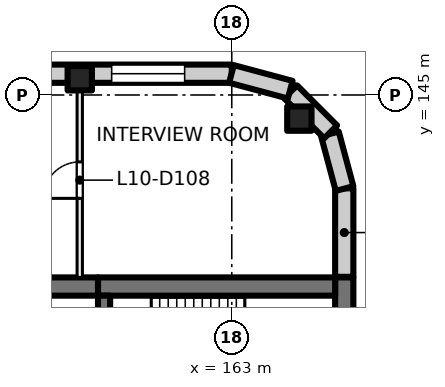
"""IFC4 building model, lengths in metres.
Left out: names, types, materials, properties, quantities, classifications, styles, units other than length and angle.
Written with IfcOpenShell. Run it as: python <this file> out.ifc"""

import sys

from ifc_helpers import new_model, si_unit, direction, frame, frame_2d, origin, origin_2d, place, context, subcontext, project, spatial, rectangle, extrude, element, fill, save


model = new_model("IFC4")
c1 = context("Model", 3, precision=1e-05, world=origin(), true_north=direction((0.0, 1.0)))
c2 = subcontext(c1, "Body", "Model", "MODEL_VIEW")
j1 = project(units=[si_unit("LENGTHUNIT", "METRE"), si_unit("PLANEANGLEUNIT", "RADIAN")], contexts=[c1])
p1 = place(None, origin())
s1 = spatial("IfcSite", under=j1, at=p1, CompositionType="ELEMENT")
p2 = place(p1, origin())
s2 = spatial("IfcBuilding", under=s1, at=p2, CompositionType="ELEMENT")
p3 = place(p2, frame((0.0, 0.0, 47.5)))
s3 = spatial("IfcBuildingStorey", under=s2, at=p3, CompositionType="ELEMENT", Elevation=47.5)
for number, where, z_axis, x_axis in (
    (1, (165.223, 144.223, 0.0), (0.0, 0.0, 1.0), (1.0, 0.0, 0.0)),
    (2, (158.0, 145.55, 0.0), (0.0, 0.0, 1.0), (1.0, 0.0, 0.0)),
):
    element("IfcColumn", number, at=place(p3, frame(where, z_axis=z_axis, x_axis=x_axis)), inside=s3, PredefinedType="COLUMN", context=c2, shape_type="SweptSolid", body=[
        extrude(rectangle(XDim=0.8, YDim=0.8, at=origin_2d()), origin(), (0.0, 0.0, 1.0), 4.0),
    ])
p4 = place(p3, frame((166.7, 139.0, 0.0), z_axis=(0.0, 0.0, 1.0), x_axis=(0.0, -1.0, 0.0)))
e3 = element("IfcWall", 3, at=p4, inside=s3, PredefinedType="SHEAR", context=c2, shape_type="SweptSolid", body=[
    extrude(rectangle(XDim=3.8, YDim=0.6, at=frame_2d((1.9, 0.0))), origin(), (0.0, 0.0, 1.0), 4.0),
])
p5 = place(p3, frame((166.4, 138.7, 0.0), z_axis=(0.0, 0.0, 1.0), x_axis=(-1.0, 0.0, 0.0)))
e4 = element("IfcWall", 4, at=p5, inside=s3, PredefinedType="SHEAR", context=c2, shape_type="SweptSolid", body=[
    extrude(rectangle(XDim=7.8, YDim=0.6, at=frame_2d((3.9, 0.0))), origin(), (0.0, 0.0, 1.0), 4.0),
])
p6 = place(p3, frame((158.6, 138.7, 0.0), z_axis=(0.0, 0.0, 1.0), x_axis=(-1.0, 0.0, 0.0)))
e5 = element("IfcWall", 5, at=p6, inside=s3, PredefinedType="SHEAR", context=c2, shape_type="SweptSolid", body=[
    extrude(rectangle(XDim=4.6, YDim=0.6, at=frame_2d((2.3, 0.0))), origin(), (0.0, 0.0, 1.0), 4.0),
])
p7 = place(p3, frame((158.8, 138.4, 0.0), z_axis=(0.0, 0.0, 1.0), x_axis=(0.0, -1.0, 0.0)))
e6 = element("IfcWall", 6, at=p7, inside=s3, PredefinedType="SHEAR", context=c2, shape_type="SweptSolid", body=[
    extrude(rectangle(XDim=2.8, YDim=0.4, at=frame_2d((1.4, 0.0))), origin(), (0.0, 0.0, 1.0), 4.0),
])
p8 = place(p7, frame((0.9, 0.0, 0.0)))
e7 = element("IfcOpeningElement", 7, at=p8, cuts=e6, PredefinedType="OPENING", context=c2, shape_type="SweptSolid", body=[
    extrude(rectangle(XDim=1.0, YDim=2.1, at=frame_2d((0.5, 1.05))), frame((0.0, 0.21, 0.0), z_axis=(0.0, -1.0, 0.0), x_axis=(1.0, 0.0, 0.0)), (0.0, 0.0, 1.0), 0.42),
])
p9 = place(p3, frame((131.07, 145.7, 0.0), z_axis=(0.0, 0.0, 1.0), x_axis=(1.0, 0.0, 0.0)))
e8 = element("IfcWall", 8, at=p9, inside=s3, PredefinedType="SOLIDWALL", context=c2, shape_type="SweptSolid", body=[
    extrude(rectangle(XDim=31.93, YDim=0.6, at=frame_2d((15.965, 0.0))), origin(), (0.0, 0.0, 1.0), 3.625),
])
p10 = place(p9, frame((0.98, 0.0, 0.9)))
e9 = element("IfcOpeningElement", 9, at=p10, cuts=e8, PredefinedType="OPENING", context=c2, shape_type="SweptSolid", body=[
    extrude(rectangle(XDim=2.4, YDim=2.4, at=frame_2d((1.2, 1.2))), frame((0.0, 0.31, 0.0), z_axis=(0.0, -1.0, 0.0), x_axis=(1.0, 0.0, 0.0)), (0.0, 0.0, 1.0), 0.62),
])
p11 = place(p9, frame((5.48, 0.0, 0.9)))
e10 = element("IfcOpeningElement", 10, at=p11, cuts=e8, PredefinedType="OPENING", context=c2, shape_type="SweptSolid", body=[
    extrude(rectangle(XDim=2.4, YDim=2.4, at=frame_2d((1.2, 1.2))), frame((0.0, 0.31, 0.0), z_axis=(0.0, -1.0, 0.0), x_axis=(1.0, 0.0, 0.0)), (0.0, 0.0, 1.0), 0.62),
])
p12 = place(p9, frame((9.98, 0.0, 0.9)))
e11 = element("IfcOpeningElement", 11, at=p12, cuts=e8, PredefinedType="OPENING", context=c2, shape_type="SweptSolid", body=[
    extrude(rectangle(XDim=2.4, YDim=2.4, at=frame_2d((1.2, 1.2))), frame((0.0, 0.31, 0.0), z_axis=(0.0, -1.0, 0.0), x_axis=(1.0, 0.0, 0.0)), (0.0, 0.0, 1.0), 0.62),
])
p13 = place(p9, frame((14.48, 0.0, 0.9)))
e12 = element("IfcOpeningElement", 12, at=p13, cuts=e8, PredefinedType="OPENING", context=c2, shape_type="SweptSolid", body=[
    extrude(rectangle(XDim=2.4, YDim=2.4, at=frame_2d((1.2, 1.2))), frame((0.0, 0.31, 0.0), z_axis=(0.0, -1.0, 0.0), x_axis=(1.0, 0.0, 0.0)), (0.0, 0.0, 1.0), 0.62),
])
p14 = place(p9, frame((18.98, 0.0, 0.9)))
e13 = element("IfcOpeningElement", 13, at=p14, cuts=e8, PredefinedType="OPENING", context=c2, shape_type="SweptSolid", body=[
    extrude(rectangle(XDim=2.4, YDim=2.4, at=frame_2d((1.2, 1.2))), frame((0.0, 0.31, 0.0), z_axis=(0.0, -1.0, 0.0), x_axis=(1.0, 0.0, 0.0)), (0.0, 0.0, 1.0), 0.62),
])
p15 = place(p9, frame((23.48, 0.0, 0.9)))
e14 = element("IfcOpeningElement", 14, at=p15, cuts=e8, PredefinedType="OPENING", context=c2, shape_type="SweptSolid", body=[
    extrude(rectangle(XDim=2.4, YDim=2.4, at=frame_2d((1.2, 1.2))), frame((0.0, 0.31, 0.0), z_axis=(0.0, -1.0, 0.0), x_axis=(1.0, 0.0, 0.0)), (0.0, 0.0, 1.0), 0.62),
])
p16 = place(p9, frame((27.98, 0.0, 0.9)))
e15 = element("IfcOpeningElement", 15, at=p16, cuts=e8, PredefinedType="OPENING", context=c2, shape_type="SweptSolid", body=[
    extrude(rectangle(XDim=2.4, YDim=2.4, at=frame_2d((1.2, 1.2))), frame((0.0, 0.31, 0.0), z_axis=(0.0, -1.0, 0.0), x_axis=(1.0, 0.0, 0.0)), (0.0, 0.0, 1.0), 0.62),
])
p17 = place(p3, frame((166.7, 141.93, 0.0), z_axis=(0.0, 0.0, 1.0), x_axis=(0.0, -1.0, 0.0)))
e16 = element("IfcWall", 16, at=p17, inside=s3, PredefinedType="SOLIDWALL", context=c2, shape_type="SweptSolid", body=[
    extrude(rectangle(XDim=2.91, YDim=0.6, at=frame_2d((1.455, 0.0))), origin(), (0.0, 0.0, 1.0), 3.625),
])
for number, where, z_axis, x_axis in (
    (17, (166.229, 143.719, 0.0), (0.0, 0.0, 1.0), (0.259, -0.966, 0.0)),
    (18, (164.936, 145.104, 0.0), (0.0, 0.0, 1.0), (0.707, -0.707, 0.0)),
):
    element("IfcWall", number, at=place(p3, frame(where, z_axis=z_axis, x_axis=x_axis)), inside=s3, PredefinedType="SOLIDWALL", context=c2, shape_type="SweptSolid", body=[
        extrude(rectangle(XDim=1.861, YDim=0.6, at=frame_2d((0.93, 0.0))), origin(), (0.0, 0.0, 1.0), 3.625),
    ])
p18 = place(p3, frame((162.99, 145.692, 0.0), z_axis=(0.0, 0.0, 1.0), x_axis=(0.965920269068, -0.258839784042, 0.0)))
e19 = element("IfcWall", 19, at=p18, inside=s3, PredefinedType="SOLIDWALL", context=c2, shape_type="SweptSolid", body=[
    extrude(rectangle(XDim=2.0, YDim=0.6, at=frame_2d((1.0, 0.0))), origin(), (0.0, 0.0, 1.0), 3.625),
])
p19 = place(p3, frame((158.0, 139.0, 0.0), z_axis=(0.0, 0.0, 1.0), x_axis=(0.0, 1.0, 0.0)))
e20 = element("IfcWall", 20, at=p19, inside=s3, PredefinedType="PARTITIONING", context=c2, shape_type="SweptSolid", body=[
    extrude(rectangle(XDim=6.4, YDim=0.175, at=frame_2d((3.2, 0.0))), origin(), (0.0, 0.0, 1.0), 3.625),
])
p20 = place(p19, frame((2.6, 0.0, 0.0)))
e21 = element("IfcOpeningElement", 21, at=p20, cuts=e20, PredefinedType="OPENING", context=c2, shape_type="SweptSolid", body=[
    extrude(rectangle(XDim=1.2, YDim=2.1, at=frame_2d((0.6, 1.05))), frame((0.0, 0.097, 0.0), z_axis=(0.0, -1.0, 0.0), x_axis=(1.0, 0.0, 0.0)), (0.0, 0.0, 1.0), 0.195),
])
p21 = place(p16, origin())
e22 = element("IfcWindow", 22, at=p21, inside=s3, PartitioningType="SINGLE_PANEL", PredefinedType="WINDOW", context=c2, shape_type="SweptSolid", body=[
    extrude(rectangle(XDim=2.4, YDim=2.4, at=frame_2d((1.2, 1.2))), frame((0.0, 0.03, 0.0), z_axis=(0.0, -1.0, 0.0), x_axis=(1.0, 0.0, 0.0)), (0.0, 0.0, 1.0), 0.06),
])
fill(e15, e22)
p22 = place(p20, origin())
e23 = element("IfcDoor", 23, at=p22, inside=s3, OperationType="DOUBLE_DOOR_SINGLE_SWING", PredefinedType="DOOR", context=c2, shape_type="SweptSolid", body=[
    extrude(rectangle(XDim=1.2, YDim=2.1, at=frame_2d((0.6, 1.05))), frame((0.0, 0.025, 0.0), z_axis=(0.0, -1.0, 0.0), x_axis=(1.0, 0.0, 0.0)), (0.0, 0.0, 1.0), 0.05),
])
fill(e21, e23)
save(model, sys.argv[1])
